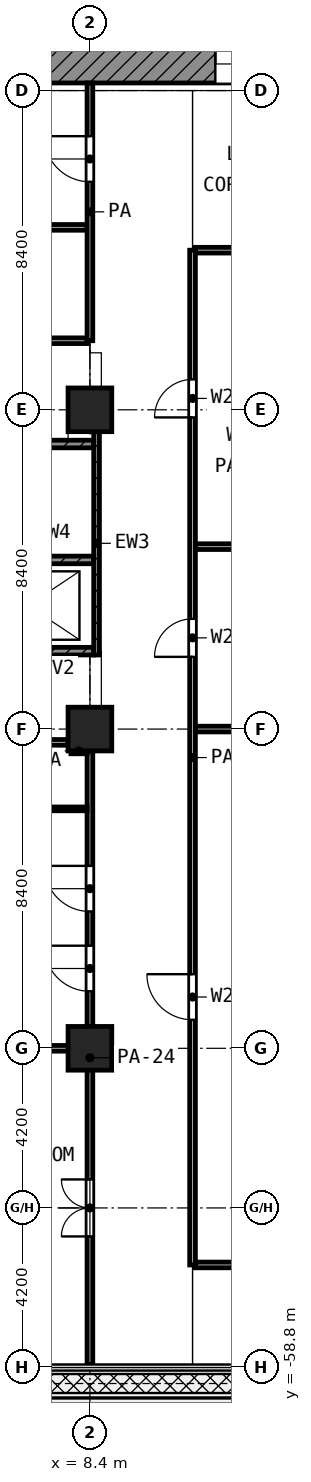
"""IFC4 building model, lengths in metres.
Left out: names, types, materials, properties, quantities, classifications, styles, units other than length and angle.
Written with IfcOpenShell. Run it as: python <this file> out.ifc"""

import sys

from ifc_helpers import new_model, si_unit, direction, frame, frame_2d, origin, origin_2d, place, context, subcontext, project, spatial, rectangle, extrude, element, fill, save


model = new_model("IFC4")
c1 = context("Model", 3, precision=1e-05, world=origin(), true_north=direction((0.0, 1.0)))
c2 = subcontext(c1, "Body", "Model", "MODEL_VIEW")
j1 = project(units=[si_unit("LENGTHUNIT", "METRE"), si_unit("PLANEANGLEUNIT", "RADIAN")], contexts=[c1])
p1 = place(None, origin())
s1 = spatial("IfcSite", under=j1, at=p1, CompositionType="ELEMENT")
p2 = place(p1, origin())
s2 = spatial("IfcBuilding", under=s1, at=p2, CompositionType="ELEMENT")
p3 = place(p2, frame((0.0, 0.0, 145.0)))
s3 = spatial("IfcBuildingStorey", under=s2, at=p3, CompositionType="ELEMENT", Elevation=145.0)
for number, where, z_axis, x_axis in (
    (1, (8.4, -33.6, 0.0), (0.0, 0.0, 1.0), (1.0, 0.0, 0.0)),
    (2, (8.4, -42.0, 0.0), (0.0, 0.0, 1.0), (1.0, 0.0, 0.0)),
    (3, (8.4, -50.4, 0.0), (0.0, 0.0, 1.0), (1.0, 0.0, 0.0)),
):
    element("IfcColumn", number, at=place(p3, frame(where, z_axis=z_axis, x_axis=x_axis)), inside=s3, PredefinedType="COLUMN", context=c2, shape_type="SweptSolid", body=[
        extrude(rectangle(XDim=1.15, YDim=1.15, at=origin_2d()), origin(), (0.0, 0.0, 1.0), 4.2),
    ])
p4 = place(p3, frame((5.4, -24.5, 0.0), z_axis=(0.0, 0.0, 1.0), x_axis=(1.0, 0.0, 0.0)))
e4 = element("IfcWall", 4, at=p4, inside=s3, PredefinedType="SHEAR", context=c2, shape_type="SweptSolid", body=[
    extrude(rectangle(XDim=18.6, YDim=1.0, at=frame_2d((9.3, 0.0))), origin(), (0.0, 0.0, 1.0), 3.6),
])
p5 = place(p4, frame((6.3, 0.0, 0.0)))
e5 = element("IfcOpeningElement", 5, at=p5, cuts=e4, PredefinedType="OPENING", context=c2, shape_type="SweptSolid", body=[
    extrude(rectangle(XDim=1.8, YDim=2.1, at=frame_2d((0.9, 1.05))), frame((0.0, 0.51, 0.0), z_axis=(0.0, -1.0, 0.0), x_axis=(1.0, 0.0, 0.0)), (0.0, 0.0, 1.0), 1.02),
])
p6 = place(p3, frame((8.575, -40.05, 0.0), z_axis=(0.0, 0.0, 1.0), x_axis=(0.0, 1.0, 0.0)))
e6 = element("IfcWall", 6, at=p6, inside=s3, PredefinedType="SHEAR", context=c2, shape_type="SweptSolid", body=[
    extrude(rectangle(XDim=5.875, YDim=0.15, at=frame_2d((2.938, 0.0))), origin(), (0.0, 0.0, 1.0), 3.6),
])
p7 = place(p3, frame((0.45, -34.5, 0.0), z_axis=(0.0, 0.0, 1.0), x_axis=(1.0, 0.0, 0.0)))
e7 = element("IfcWall", 7, at=p7, inside=s3, PredefinedType="SHEAR", context=c2, shape_type="SweptSolid", body=[
    extrude(rectangle(XDim=8.05, YDim=0.2, at=frame_2d((4.025, 0.0))), origin(), (0.0, 0.0, 1.0), 3.6),
])
p8 = place(p7, frame((0.75, 0.0, 0.0)))
e8 = element("IfcOpeningElement", 8, at=p8, cuts=e7, PredefinedType="OPENING", context=c2, shape_type="SweptSolid", body=[
    extrude(rectangle(XDim=1.1, YDim=2.1, at=frame_2d((0.55, 1.05))), frame((0.0, 0.11, 0.0), z_axis=(0.0, -1.0, 0.0), x_axis=(1.0, 0.0, 0.0)), (0.0, 0.0, 1.0), 0.22),
])
p9 = place(p3, frame((0.45, -37.55, 0.0), z_axis=(0.0, 0.0, 1.0), x_axis=(1.0, 0.0, 0.0)))
e9 = element("IfcWall", 9, at=p9, inside=s3, PredefinedType="SHEAR", context=c2, shape_type="SweptSolid", body=[
    extrude(rectangle(XDim=8.05, YDim=0.2, at=frame_2d((4.025, 0.0))), origin(), (0.0, 0.0, 1.0), 3.6),
])
p10 = place(p9, frame((0.1, 0.0, 0.0)))
e10 = element("IfcOpeningElement", 10, at=p10, cuts=e9, PredefinedType="OPENING", context=c2, shape_type="SweptSolid", body=[
    extrude(rectangle(XDim=1.1, YDim=2.1, at=frame_2d((0.55, 1.05))), frame((0.0, 0.11, 0.0), z_axis=(0.0, -1.0, 0.0), x_axis=(1.0, 0.0, 0.0)), (0.0, 0.0, 1.0), 0.22),
])
p11 = place(p3, frame((0.45, -39.95, 0.0), z_axis=(0.0, 0.0, 1.0), x_axis=(1.0, 0.0, 0.0)))
e11 = element("IfcWall", 11, at=p11, inside=s3, PredefinedType="SHEAR", context=c2, shape_type="SweptSolid", body=[
    extrude(rectangle(XDim=8.05, YDim=0.2, at=frame_2d((4.025, 0.0))), origin(), (0.0, 0.0, 1.0), 3.6),
])
p12 = place(p11, frame((2.0, 0.0, 0.0)))
e12 = element("IfcOpeningElement", 12, at=p12, cuts=e11, PredefinedType="OPENING", context=c2, shape_type="SweptSolid", body=[
    extrude(rectangle(XDim=1.1, YDim=2.1, at=frame_2d((0.55, 1.05))), frame((0.0, 0.11, 0.0), z_axis=(0.0, -1.0, 0.0), x_axis=(1.0, 0.0, 0.0)), (0.0, 0.0, 1.0), 0.22),
])
p13 = place(p3, frame((5.15, -44.1, 0.0), z_axis=(0.0, 0.0, 1.0), x_axis=(1.0, 0.0, 0.0)))
e13 = element("IfcWall", 13, at=p13, inside=s3, PredefinedType="PARTITIONING", context=c2, shape_type="SweptSolid", body=[
    extrude(rectangle(XDim=3.175, YDim=0.1, at=frame_2d((1.587, 0.0))), origin(), (0.0, 0.0, 1.0), 3.6),
])
p14 = place(p3, frame((11.175, -56.1, 0.0), z_axis=(0.0, 0.0, 1.0), x_axis=(1.0, 0.0, 0.0)))
e14 = element("IfcWall", 14, at=p14, inside=s3, PredefinedType="PARTITIONING", context=c2, shape_type="SweptSolid", body=[
    extrude(rectangle(XDim=2.85, YDim=0.15, at=frame_2d((1.425, 0.0))), origin(), (0.0, 0.0, 1.0), 3.6),
])
p15 = place(p3, frame((0.08, -50.4, 0.0), z_axis=(0.0, 0.0, 1.0), x_axis=(1.0, 0.0, 0.0)))
e15 = element("IfcWall", 15, at=p15, inside=s3, PredefinedType="PARTITIONING", context=c2, shape_type="SweptSolid", body=[
    extrude(rectangle(XDim=8.245, YDim=0.15, at=frame_2d((4.123, 0.0))), origin(), (0.0, 0.0, 1.0), 3.6),
])
p16 = place(p3, frame((7.9, -42.575, 0.0), z_axis=(0.0, 0.0, 1.0), x_axis=(1.0, 0.0, 0.0)))
e16 = element("IfcWall", 16, at=p16, inside=s3, PredefinedType="PARTITIONING", context=c2, shape_type="SweptSolid", body=[
    extrude(rectangle(XDim=0.425, YDim=0.15, at=frame_2d((0.212, 0.0))), origin(), (0.0, 0.0, 1.0), 3.6),
])
p17 = place(p3, frame((2.325, -42.35, 0.0), z_axis=(0.0, 0.0, 1.0), x_axis=(1.0, 0.0, 0.0)))
e17 = element("IfcWall", 17, at=p17, inside=s3, PredefinedType="PARTITIONING", context=c2, shape_type="SweptSolid", body=[
    extrude(rectangle(XDim=5.498, YDim=0.15, at=frame_2d((2.749, 0.0))), origin(), (0.0, 0.0, 1.0), 3.6),
])
for number, where, z_axis, x_axis in (
    (18, (11.175, -42.0, 0.0), (0.0, 0.0, 1.0), (1.0, 0.0, 0.0)),
    (19, (11.175, -37.2, 0.0), (0.0, 0.0, 1.0), (1.0, 0.0, 0.0)),
):
    element("IfcWall", number, at=place(p3, frame(where, z_axis=z_axis, x_axis=x_axis)), inside=s3, PredefinedType="PARTITIONING", context=c2, shape_type="SweptSolid", body=[
        extrude(rectangle(XDim=2.85, YDim=0.15, at=frame_2d((1.425, 0.0))), origin(), (0.0, 0.0, 1.0), 3.6),
    ])
p18 = place(p3, frame((1.077, -31.782, 0.0), z_axis=(0.0, 0.0, 1.0), x_axis=(1.0, 0.0, 0.0)))
e20 = element("IfcWall", 20, at=p18, inside=s3, PredefinedType="PARTITIONING", context=c2, shape_type="SweptSolid", body=[
    extrude(rectangle(XDim=7.248, YDim=0.15, at=frame_2d((3.624, 0.0))), origin(), (0.0, 0.0, 1.0), 3.6),
])
p19 = place(p18, frame((3.024, 0.0, 0.0)))
e21 = element("IfcOpeningElement", 21, at=p19, cuts=e20, PredefinedType="OPENING", context=c2, shape_type="SweptSolid", body=[
    extrude(rectangle(XDim=1.2, YDim=2.1, at=frame_2d((0.6, 1.05))), frame((0.0, 0.085, 0.0), z_axis=(0.0, -1.0, 0.0), x_axis=(1.0, 0.0, 0.0)), (0.0, 0.0, 1.0), 0.17),
])
p20 = place(p3, frame((11.175, -29.4, 0.0), z_axis=(0.0, 0.0, 1.0), x_axis=(1.0, 0.0, 0.0)))
e22 = element("IfcWall", 22, at=p20, inside=s3, PredefinedType="PARTITIONING", context=c2, shape_type="SweptSolid", body=[
    extrude(rectangle(XDim=2.85, YDim=0.15, at=frame_2d((1.425, 0.0))), origin(), (0.0, 0.0, 1.0), 3.6),
])
p21 = place(p3, frame((0.08, -28.8, 0.0), z_axis=(0.0, 0.0, 1.0), x_axis=(1.0, 0.0, 0.0)))
e23 = element("IfcWall", 23, at=p21, inside=s3, PredefinedType="PARTITIONING", context=c2, shape_type="SweptSolid", body=[
    extrude(rectangle(XDim=8.245, YDim=0.15, at=frame_2d((4.123, 0.0))), origin(), (0.0, 0.0, 1.0), 3.6),
])
p22 = place(p3, frame((8.4, -58.72, 0.0), z_axis=(0.0, 0.0, 1.0), x_axis=(0.0, 1.0, 0.0)))
e24 = element("IfcWall", 24, at=p22, inside=s3, PredefinedType="PARTITIONING", context=c2, shape_type="SweptSolid", body=[
    extrude(rectangle(XDim=16.145, YDim=0.15, at=frame_2d((8.073, 0.0))), origin(), (0.0, 0.0, 1.0), 2.7),
])
p23 = place(p22, frame((9.82, 0.0, 0.0)))
e25 = element("IfcOpeningElement", 25, at=p23, cuts=e24, PredefinedType="OPENING", context=c2, shape_type="SweptSolid", body=[
    extrude(rectangle(XDim=1.2, YDim=2.1, at=frame_2d((0.6, 1.05))), frame((0.0, 0.085, 0.0), z_axis=(0.0, -1.0, 0.0), x_axis=(1.0, 0.0, 0.0)), (0.0, 0.0, 1.0), 0.17),
])
p24 = place(p22, frame((11.92, 0.0, 0.0)))
e26 = element("IfcOpeningElement", 26, at=p24, cuts=e24, PredefinedType="OPENING", context=c2, shape_type="SweptSolid", body=[
    extrude(rectangle(XDim=1.2, YDim=2.1, at=frame_2d((0.6, 1.05))), frame((0.0, 0.085, 0.0), z_axis=(0.0, -1.0, 0.0), x_axis=(1.0, 0.0, 0.0)), (0.0, 0.0, 1.0), 0.17),
])
p25 = place(p22, frame((3.37, 0.0, 0.0)))
e27 = element("IfcOpeningElement", 27, at=p25, cuts=e24, PredefinedType="OPENING", context=c2, shape_type="SweptSolid", body=[
    extrude(rectangle(XDim=1.5, YDim=2.1, at=frame_2d((0.75, 1.05))), frame((0.0, 0.085, 0.0), z_axis=(0.0, -1.0, 0.0), x_axis=(1.0, 0.0, 0.0)), (0.0, 0.0, 1.0), 0.17),
])
p26 = place(p3, frame((8.4, -31.782, 0.0), z_axis=(0.0, 0.0, 1.0), x_axis=(0.0, 1.0, 0.0)))
e28 = element("IfcWall", 28, at=p26, inside=s3, PredefinedType="PARTITIONING", context=c2, shape_type="SweptSolid", body=[
    extrude(rectangle(XDim=6.782, YDim=0.15, at=frame_2d((3.391, 0.0))), origin(), (0.0, 0.0, 1.0), 3.6),
])
p27 = place(p26, frame((4.182, 0.0, 0.0)))
e29 = element("IfcOpeningElement", 29, at=p27, cuts=e28, PredefinedType="OPENING", context=c2, shape_type="SweptSolid", body=[
    extrude(rectangle(XDim=1.2, YDim=2.1, at=frame_2d((0.6, 1.05))), frame((0.0, 0.085, 0.0), z_axis=(0.0, -1.0, 0.0), x_axis=(1.0, 0.0, 0.0)), (0.0, 0.0, 1.0), 0.17),
])
p28 = place(p3, frame((11.1, -56.1, 0.0), z_axis=(0.0, 0.0, 1.0), x_axis=(0.0, 1.0, 0.0)))
e30 = element("IfcWall", 30, at=p28, inside=s3, PredefinedType="PARTITIONING", context=c2, shape_type="SweptSolid", body=[
    extrude(rectangle(XDim=26.7, YDim=0.15, at=frame_2d((13.35, 0.0))), origin(), (0.0, 0.0, 1.0), 3.6),
])
p29 = place(p28, frame((22.3, 0.0, 0.0)))
e31 = element("IfcOpeningElement", 31, at=p29, cuts=e30, PredefinedType="OPENING", context=c2, shape_type="SweptSolid", body=[
    extrude(rectangle(XDim=1.0, YDim=2.1, at=frame_2d((0.5, 1.05))), frame((0.0, 0.085, 0.0), z_axis=(0.0, -1.0, 0.0), x_axis=(1.0, 0.0, 0.0)), (0.0, 0.0, 1.0), 0.17),
])
p30 = place(p28, frame((16.0, 0.0, 0.0)))
e32 = element("IfcOpeningElement", 32, at=p30, cuts=e30, PredefinedType="OPENING", context=c2, shape_type="SweptSolid", body=[
    extrude(rectangle(XDim=1.0, YDim=2.1, at=frame_2d((0.5, 1.05))), frame((0.0, 0.085, 0.0), z_axis=(0.0, -1.0, 0.0), x_axis=(1.0, 0.0, 0.0)), (0.0, 0.0, 1.0), 0.17),
])
p31 = place(p28, frame((6.45, 0.0, 0.0)))
e33 = element("IfcOpeningElement", 33, at=p31, cuts=e30, PredefinedType="OPENING", context=c2, shape_type="SweptSolid", body=[
    extrude(rectangle(XDim=1.2, YDim=2.1, at=frame_2d((0.6, 1.05))), frame((0.0, 0.085, 0.0), z_axis=(0.0, -1.0, 0.0), x_axis=(1.0, 0.0, 0.0)), (0.0, 0.0, 1.0), 0.17),
])
p32 = place(p5, origin())
e34 = element("IfcDoor", 34, at=p32, inside=s3, OperationType="DOUBLE_DOOR_SINGLE_SWING", PredefinedType="DOOR", context=c2, shape_type="SweptSolid", body=[
    extrude(rectangle(XDim=1.8, YDim=2.1, at=frame_2d((0.9, 1.05))), frame((0.0, 0.025, 0.0), z_axis=(0.0, -1.0, 0.0), x_axis=(1.0, 0.0, 0.0)), (0.0, 0.0, 1.0), 0.05),
])
fill(e5, e34)
p33 = place(p27, origin())
e35 = element("IfcDoor", 35, at=p33, inside=s3, OperationType="SINGLE_SWING_RIGHT", PredefinedType="DOOR", context=c2, shape_type="SweptSolid", body=[
    extrude(rectangle(XDim=1.2, YDim=2.1, at=frame_2d((0.6, 1.05))), frame((0.0, 0.025, 0.0), z_axis=(0.0, -1.0, 0.0), x_axis=(1.0, 0.0, 0.0)), (0.0, 0.0, 1.0), 0.05),
])
fill(e29, e35)
p34 = place(p23, origin())
e36 = element("IfcDoor", 36, at=p34, inside=s3, OperationType="SINGLE_SWING_RIGHT", PredefinedType="DOOR", context=c2, shape_type="SweptSolid", body=[
    extrude(rectangle(XDim=1.2, YDim=2.1, at=frame_2d((0.6, 1.05))), frame((0.0, 0.025, 0.0), z_axis=(0.0, -1.0, 0.0), x_axis=(1.0, 0.0, 0.0)), (0.0, 0.0, 1.0), 0.05),
])
fill(e25, e36)
p35 = place(p24, origin())
e37 = element("IfcDoor", 37, at=p35, inside=s3, OperationType="SINGLE_SWING_RIGHT", PredefinedType="DOOR", context=c2, shape_type="SweptSolid", body=[
    extrude(rectangle(XDim=1.2, YDim=2.1, at=frame_2d((0.6, 1.05))), frame((0.0, 0.025, 0.0), z_axis=(0.0, -1.0, 0.0), x_axis=(1.0, 0.0, 0.0)), (0.0, 0.0, 1.0), 0.05),
])
fill(e26, e37)
p36 = place(p25, origin())
e38 = element("IfcDoor", 38, at=p36, inside=s3, OperationType="DOUBLE_DOOR_SINGLE_SWING", PredefinedType="DOOR", context=c2, shape_type="SweptSolid", body=[
    extrude(rectangle(XDim=1.5, YDim=2.1, at=frame_2d((0.75, 1.05))), frame((0.0, 0.025, 0.0), z_axis=(0.0, -1.0, 0.0), x_axis=(1.0, 0.0, 0.0)), (0.0, 0.0, 1.0), 0.05),
])
fill(e27, e38)
p37 = place(p29, origin())
e39 = element("IfcDoor", 39, at=p37, inside=s3, OperationType="SINGLE_SWING_LEFT", PredefinedType="DOOR", context=c2, shape_type="SweptSolid", body=[
    extrude(rectangle(XDim=1.0, YDim=2.1, at=frame_2d((0.5, 1.05))), frame((0.0, 0.025, 0.0), z_axis=(0.0, -1.0, 0.0), x_axis=(1.0, 0.0, 0.0)), (0.0, 0.0, 1.0), 0.05),
])
fill(e31, e39)
p38 = place(p30, origin())
e40 = element("IfcDoor", 40, at=p38, inside=s3, OperationType="SINGLE_SWING_LEFT", PredefinedType="DOOR", context=c2, shape_type="SweptSolid", body=[
    extrude(rectangle(XDim=1.0, YDim=2.1, at=frame_2d((0.5, 1.05))), frame((0.0, 0.025, 0.0), z_axis=(0.0, -1.0, 0.0), x_axis=(1.0, 0.0, 0.0)), (0.0, 0.0, 1.0), 0.05),
])
fill(e32, e40)
p39 = place(p31, origin())
e41 = element("IfcDoor", 41, at=p39, inside=s3, OperationType="SINGLE_SWING_RIGHT", PredefinedType="DOOR", context=c2, shape_type="SweptSolid", body=[
    extrude(rectangle(XDim=1.2, YDim=2.1, at=frame_2d((0.6, 1.05))), frame((0.0, 0.025, 0.0), z_axis=(0.0, -1.0, 0.0), x_axis=(1.0, 0.0, 0.0)), (0.0, 0.0, 1.0), 0.05),
])
fill(e33, e41)
save(model, sys.argv[1])
